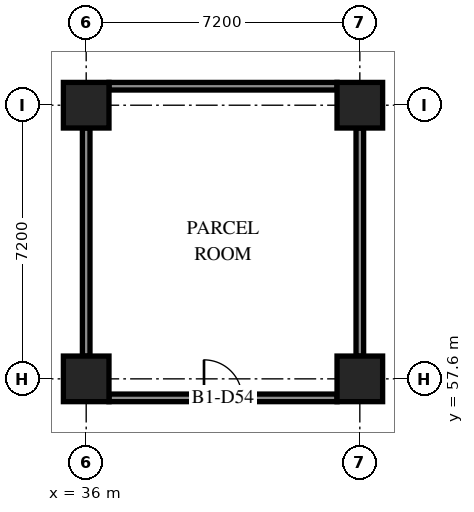
"""IFC4 building model, lengths in metres.
Left out: names, types, materials, properties, quantities, classifications, styles, units other than length and angle.
Written with IfcOpenShell. Run it as: python <this file> out.ifc"""

import sys

from ifc_helpers import new_model, si_unit, direction, frame, frame_2d, origin, origin_2d, place, context, subcontext, project, spatial, rectangle, extrude, element, fill, save


model = new_model("IFC4")
c1 = context("Model", 3, precision=1e-05, world=origin(), true_north=direction((0.0, 1.0)))
c2 = subcontext(c1, "Body", "Model", "MODEL_VIEW")
j1 = project(units=[si_unit("LENGTHUNIT", "METRE"), si_unit("PLANEANGLEUNIT", "RADIAN")], contexts=[c1])
p1 = place(None, origin())
s1 = spatial("IfcSite", under=j1, at=p1, CompositionType="ELEMENT")
p2 = place(p1, origin())
s2 = spatial("IfcBuilding", under=s1, at=p2, CompositionType="ELEMENT")
p3 = place(p2, frame((0.0, 0.0, -4.5)))
s3 = spatial("IfcBuildingStorey", under=s2, at=p3, CompositionType="ELEMENT", Elevation=-4.5)
for number, where, z_axis, x_axis in (
    (1, (36.0, 57.6, 0.0), (0.0, 0.0, 1.0), (1.0, 0.0, 0.0)),
    (2, (36.0, 64.8, 0.0), (0.0, 0.0, 1.0), (1.0, 0.0, 0.0)),
    (3, (43.2, 57.6, 0.0), (0.0, 0.0, 1.0), (1.0, 0.0, 0.0)),
    (4, (43.2, 64.8, 0.0), (0.0, 0.0, 1.0), (1.0, 0.0, 0.0)),
):
    element("IfcColumn", number, at=place(p3, frame(where, z_axis=z_axis, x_axis=x_axis)), inside=s3, PredefinedType="COLUMN", context=c2, shape_type="SweptSolid", body=[
        extrude(rectangle(XDim=1.2, YDim=1.2, at=origin_2d()), origin(), (0.0, 0.0, 1.0), 4.1),
    ])
for number, where, z_axis, x_axis in (
    (5, (36.0, 58.2, 0.0), (0.0, 0.0, 1.0), (0.0, 1.0, 0.0)),
    (6, (43.2, 58.2, 0.0), (0.0, 0.0, 1.0), (0.0, 1.0, 0.0)),
):
    element("IfcWall", number, at=place(p3, frame(where, z_axis=z_axis, x_axis=x_axis)), inside=s3, PredefinedType="PARTITIONING", context=c2, shape_type="SweptSolid", body=[
        extrude(rectangle(XDim=6.0, YDim=0.2, at=frame_2d((3.0, 0.0))), origin(), (0.0, 0.0, 1.0), 4.1),
    ])
p4 = place(p3, frame((36.6, 57.1, 0.0), z_axis=(0.0, 0.0, 1.0), x_axis=(1.0, 0.0, 0.0)))
e7 = element("IfcWall", 7, at=p4, inside=s3, PredefinedType="PARTITIONING", context=c2, shape_type="SweptSolid", body=[
    extrude(rectangle(XDim=6.0, YDim=0.2, at=frame_2d((3.0, 0.0))), origin(), (0.0, 0.0, 1.0), 4.1),
])
p5 = place(p4, frame((2.5, 0.0, 0.0)))
e8 = element("IfcOpeningElement", 8, at=p5, cuts=e7, PredefinedType="OPENING", context=c2, shape_type="SweptSolid", body=[
    extrude(rectangle(XDim=1.0, YDim=2.1, at=frame_2d((0.5, 1.05))), frame((0.0, 0.11, 0.0), z_axis=(0.0, -1.0, 0.0), x_axis=(1.0, 0.0, 0.0)), (0.0, 0.0, 1.0), 0.22),
])
p6 = place(p3, frame((36.6, 65.3, 0.0), z_axis=(0.0, 0.0, 1.0), x_axis=(1.0, 0.0, 0.0)))
e9 = element("IfcWall", 9, at=p6, inside=s3, PredefinedType="PARTITIONING", context=c2, shape_type="SweptSolid", body=[
    extrude(rectangle(XDim=6.0, YDim=0.2, at=frame_2d((3.0, 0.0))), origin(), (0.0, 0.0, 1.0), 4.1),
])
p7 = place(p5, origin())
e10 = element("IfcDoor", 10, at=p7, inside=s3, OperationType="SINGLE_SWING_LEFT", PredefinedType="DOOR", context=c2, shape_type="SweptSolid", body=[
    extrude(rectangle(XDim=1.0, YDim=2.1, at=frame_2d((0.5, 1.05))), frame((0.0, 0.025, 0.0), z_axis=(0.0, -1.0, 0.0), x_axis=(1.0, 0.0, 0.0)), (0.0, 0.0, 1.0), 0.05),
])
fill(e8, e10)
save(model, sys.argv[1])
